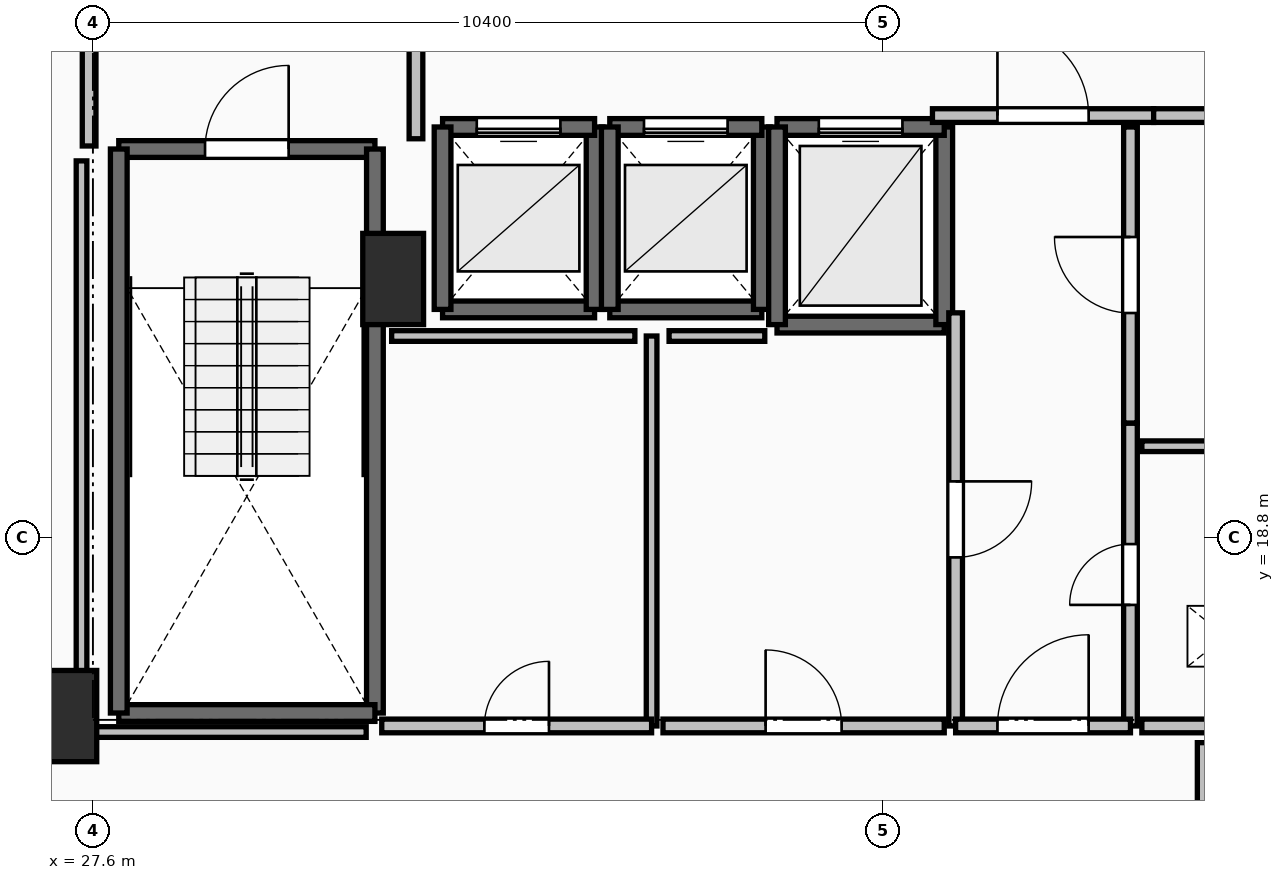
"""IFC4 building model, lengths in metres.
Left out: names, types, materials, properties, quantities, classifications, styles, units other than length and angle.
Written with IfcOpenShell. Run it as: python <this file> out.ifc"""

import sys

from ifc_helpers import new_model, si_unit, direction, frame, frame_2d, origin, origin_2d, place, context, subcontext, project, spatial, rectangle, extrude, element, fill, save


model = new_model("IFC4")
c1 = context("Model", 3, precision=1e-05, world=origin(), true_north=direction((0.0, 1.0)))
c2 = subcontext(c1, "Body", "Model", "MODEL_VIEW")
j1 = project(units=[si_unit("LENGTHUNIT", "METRE"), si_unit("PLANEANGLEUNIT", "RADIAN")], contexts=[c1])
p1 = place(None, origin())
s1 = spatial("IfcSite", under=j1, at=p1, CompositionType="ELEMENT")
p2 = place(p1, origin())
s2 = spatial("IfcBuilding", under=s1, at=p2, CompositionType="ELEMENT")
p3 = place(p2, frame((0.0, 0.0, 157.1)))
s3 = spatial("IfcBuildingStorey", under=s2, at=p3, CompositionType="ELEMENT", Elevation=157.1)
for number, where, z_axis, x_axis in (
    (1, (27.25, 16.45, 0.0), (0.0, 0.0, 1.0), (1.0, 0.0, 0.0)),
    (2, (31.55, 22.2, 0.0), (0.0, 0.0, 1.0), (1.0, 0.0, 0.0)),
):
    element("IfcColumn", number, at=place(p3, frame(where, z_axis=z_axis, x_axis=x_axis)), inside=s3, PredefinedType="PILASTER", context=c2, shape_type="SweptSolid", body=[
        extrude(rectangle(XDim=0.8, YDim=1.2, at=origin_2d()), origin(), (0.0, 0.0, 1.0), 3.5),
    ])
p4 = place(p3, frame((27.94, 23.91, 0.0), z_axis=(0.0, 0.0, 1.0), x_axis=(1.0, 0.0, 0.0)))
e3 = element("IfcWall", 3, at=p4, inside=s3, PredefinedType="SOLIDWALL", context=c2, shape_type="SweptSolid", body=[
    extrude(rectangle(XDim=3.37, YDim=0.22, at=frame_2d((1.685, 0.0))), origin(), (0.0, 0.0, 1.0), 3.24),
])
p5 = place(p4, frame((1.135, 0.0, 0.0)))
e4 = element("IfcOpeningElement", 4, at=p5, cuts=e3, PredefinedType="OPENING", context=c2, shape_type="SweptSolid", body=[
    extrude(rectangle(XDim=1.1, YDim=2.15, at=frame_2d((0.55, 1.075))), frame((0.0, 0.125, 0.0), z_axis=(0.0, -1.0, 0.0), x_axis=(1.0, 0.0, 0.0)), (0.0, 0.0, 1.0), 0.25),
])
p6 = place(p3, frame((31.31, 23.91, 0.0), z_axis=(0.0, 0.0, 1.0), x_axis=(0.0, -1.0, 0.0)))
e5 = element("IfcWall", 5, at=p6, inside=s3, PredefinedType="SOLIDWALL", context=c2, shape_type="SweptSolid", body=[
    extrude(rectangle(XDim=7.42, YDim=0.22, at=frame_2d((3.71, 0.0))), origin(), (0.0, 0.0, 1.0), 3.24),
])
p7 = place(p3, frame((31.31, 16.49, 0.0), z_axis=(0.0, 0.0, 1.0), x_axis=(-1.0, 0.0, 0.0)))
e6 = element("IfcWall", 6, at=p7, inside=s3, PredefinedType="SOLIDWALL", context=c2, shape_type="SweptSolid", body=[
    extrude(rectangle(XDim=3.37, YDim=0.22, at=frame_2d((1.685, 0.0))), origin(), (0.0, 0.0, 1.0), 3.24),
])
p8 = place(p3, frame((27.94, 16.49, 0.0), z_axis=(0.0, 0.0, 1.0), x_axis=(0.0, 1.0, 0.0)))
e7 = element("IfcWall", 7, at=p8, inside=s3, PredefinedType="SOLIDWALL", context=c2, shape_type="SweptSolid", body=[
    extrude(rectangle(XDim=7.42, YDim=0.22, at=frame_2d((3.71, 0.0))), origin(), (0.0, 0.0, 1.0), 3.24),
])
p9 = place(p3, frame((32.2, 21.8, 0.0), z_axis=(0.0, 0.0, 1.0), x_axis=(1.0, 0.0, 0.0)))
e8 = element("IfcWall", 8, at=p9, inside=s3, PredefinedType="SOLIDWALL", context=c2, shape_type="SweptSolid", body=[
    extrude(rectangle(XDim=2.0, YDim=0.22, at=frame_2d((1.0, 0.0))), origin(), (0.0, 0.0, 1.0), 3.24),
])
p10 = place(p3, frame((34.2, 21.8, 0.0), z_axis=(0.0, 0.0, 1.0), x_axis=(0.0, 1.0, 0.0)))
e9 = element("IfcWall", 9, at=p10, inside=s3, PredefinedType="SOLIDWALL", context=c2, shape_type="SweptSolid", body=[
    extrude(rectangle(XDim=2.4, YDim=0.22, at=frame_2d((1.2, 0.0))), origin(), (0.0, 0.0, 1.0), 3.24),
])
p11 = place(p3, frame((34.2, 24.2, 0.0), z_axis=(0.0, 0.0, 1.0), x_axis=(-1.0, 0.0, 0.0)))
e10 = element("IfcWall", 10, at=p11, inside=s3, PredefinedType="SOLIDWALL", context=c2, shape_type="SweptSolid", body=[
    extrude(rectangle(XDim=2.0, YDim=0.22, at=frame_2d((1.0, 0.0))), origin(), (0.0, 0.0, 1.0), 3.24),
])
p12 = place(p11, frame((0.45, 0.0, 0.0)))
e11 = element("IfcOpeningElement", 11, at=p12, cuts=e10, PredefinedType="OPENING", context=c2, shape_type="SweptSolid", body=[
    extrude(rectangle(XDim=1.1, YDim=2.2, at=frame_2d((0.55, 1.1))), frame((0.0, 0.125, 0.0), z_axis=(0.0, -1.0, 0.0), x_axis=(1.0, 0.0, 0.0)), (0.0, 0.0, 1.0), 0.25),
])
p13 = place(p3, frame((32.2, 24.2, 0.0), z_axis=(0.0, 0.0, 1.0), x_axis=(0.0, -1.0, 0.0)))
e12 = element("IfcWall", 12, at=p13, inside=s3, PredefinedType="SOLIDWALL", context=c2, shape_type="SweptSolid", body=[
    extrude(rectangle(XDim=2.4, YDim=0.22, at=frame_2d((1.2, 0.0))), origin(), (0.0, 0.0, 1.0), 3.24),
])
p14 = place(p3, frame((34.4, 21.8, 0.0), z_axis=(0.0, 0.0, 1.0), x_axis=(1.0, 0.0, 0.0)))
e13 = element("IfcWall", 13, at=p14, inside=s3, PredefinedType="SOLIDWALL", context=c2, shape_type="SweptSolid", body=[
    extrude(rectangle(XDim=2.0, YDim=0.22, at=frame_2d((1.0, 0.0))), origin(), (0.0, 0.0, 1.0), 3.24),
])
p15 = place(p3, frame((36.4, 21.8, 0.0), z_axis=(0.0, 0.0, 1.0), x_axis=(0.0, 1.0, 0.0)))
e14 = element("IfcWall", 14, at=p15, inside=s3, PredefinedType="SOLIDWALL", context=c2, shape_type="SweptSolid", body=[
    extrude(rectangle(XDim=2.4, YDim=0.22, at=frame_2d((1.2, 0.0))), origin(), (0.0, 0.0, 1.0), 3.24),
])
p16 = place(p3, frame((36.4, 24.2, 0.0), z_axis=(0.0, 0.0, 1.0), x_axis=(-1.0, 0.0, 0.0)))
e15 = element("IfcWall", 15, at=p16, inside=s3, PredefinedType="SOLIDWALL", context=c2, shape_type="SweptSolid", body=[
    extrude(rectangle(XDim=2.0, YDim=0.22, at=frame_2d((1.0, 0.0))), origin(), (0.0, 0.0, 1.0), 3.24),
])
p17 = place(p16, frame((0.45, 0.0, 0.0)))
e16 = element("IfcOpeningElement", 16, at=p17, cuts=e15, PredefinedType="OPENING", context=c2, shape_type="SweptSolid", body=[
    extrude(rectangle(XDim=1.1, YDim=2.2, at=frame_2d((0.55, 1.1))), frame((0.0, 0.125, 0.0), z_axis=(0.0, -1.0, 0.0), x_axis=(1.0, 0.0, 0.0)), (0.0, 0.0, 1.0), 0.25),
])
p18 = place(p3, frame((34.4, 24.2, 0.0), z_axis=(0.0, 0.0, 1.0), x_axis=(0.0, -1.0, 0.0)))
e17 = element("IfcWall", 17, at=p18, inside=s3, PredefinedType="SOLIDWALL", context=c2, shape_type="SweptSolid", body=[
    extrude(rectangle(XDim=2.4, YDim=0.22, at=frame_2d((1.2, 0.0))), origin(), (0.0, 0.0, 1.0), 3.24),
])
p19 = place(p3, frame((36.6, 21.6, 0.0), z_axis=(0.0, 0.0, 1.0), x_axis=(1.0, 0.0, 0.0)))
e18 = element("IfcWall", 18, at=p19, inside=s3, PredefinedType="SOLIDWALL", context=c2, shape_type="SweptSolid", body=[
    extrude(rectangle(XDim=2.2, YDim=0.22, at=frame_2d((1.1, 0.0))), origin(), (0.0, 0.0, 1.0), 3.24),
])
p20 = place(p3, frame((38.8, 21.6, 0.0), z_axis=(0.0, 0.0, 1.0), x_axis=(0.0, 1.0, 0.0)))
e19 = element("IfcWall", 19, at=p20, inside=s3, PredefinedType="SOLIDWALL", context=c2, shape_type="SweptSolid", body=[
    extrude(rectangle(XDim=2.6, YDim=0.22, at=frame_2d((1.3, 0.0))), origin(), (0.0, 0.0, 1.0), 3.24),
])
p21 = place(p3, frame((38.8, 24.2, 0.0), z_axis=(0.0, 0.0, 1.0), x_axis=(-1.0, 0.0, 0.0)))
e20 = element("IfcWall", 20, at=p21, inside=s3, PredefinedType="SOLIDWALL", context=c2, shape_type="SweptSolid", body=[
    extrude(rectangle(XDim=2.2, YDim=0.22, at=frame_2d((1.1, 0.0))), origin(), (0.0, 0.0, 1.0), 3.24),
])
p22 = place(p21, frame((0.55, 0.0, 0.0)))
e21 = element("IfcOpeningElement", 21, at=p22, cuts=e20, PredefinedType="OPENING", context=c2, shape_type="SweptSolid", body=[
    extrude(rectangle(XDim=1.1, YDim=2.2, at=frame_2d((0.55, 1.1))), frame((0.0, 0.125, 0.0), z_axis=(0.0, -1.0, 0.0), x_axis=(1.0, 0.0, 0.0)), (0.0, 0.0, 1.0), 0.25),
])
p23 = place(p3, frame((36.6, 24.2, 0.0), z_axis=(0.0, 0.0, 1.0), x_axis=(0.0, -1.0, 0.0)))
e22 = element("IfcWall", 22, at=p23, inside=s3, PredefinedType="SOLIDWALL", context=c2, shape_type="SweptSolid", body=[
    extrude(rectangle(XDim=2.6, YDim=0.22, at=frame_2d((1.3, 0.0))), origin(), (0.0, 0.0, 1.0), 3.24),
])
p24 = place(p3, frame((31.85, 24.045, 0.0), z_axis=(0.0, 0.0, 1.0), x_axis=(0.0, 1.0, 0.0)))
e23 = element("IfcWall", 23, at=p24, inside=s3, PredefinedType="PARTITIONING", context=c2, shape_type="SweptSolid", body=[
    extrude(rectangle(XDim=3.91, YDim=0.18, at=frame_2d((1.955, 0.0))), origin(), (0.0, 0.0, 1.0), 3.24),
])
p25 = place(p24, frame((1.355, 0.0, 0.0)))
e24 = element("IfcOpeningElement", 24, at=p25, cuts=e23, PredefinedType="OPENING", context=c2, shape_type="SweptSolid", body=[
    extrude(rectangle(XDim=1.2, YDim=2.15, at=frame_2d((0.6, 1.075))), frame((0.0, 0.105, 0.0), z_axis=(0.0, -1.0, 0.0), x_axis=(1.0, 0.0, 0.0)), (0.0, 0.0, 1.0), 0.21),
])
p26 = place(p3, frame((27.55, 28.0, 0.0), z_axis=(0.0, 0.0, 1.0), x_axis=(0.0, -1.0, 0.0)))
e25 = element("IfcWall", 25, at=p26, inside=s3, PredefinedType="PARTITIONING", context=c2, shape_type="SweptSolid", body=[
    extrude(rectangle(XDim=4.05, YDim=0.18, at=frame_2d((2.025, 0.0))), origin(), (0.0, 0.0, 1.0), 3.24),
])
p27 = place(p26, frame((1.425, 0.0, 0.0)))
e26 = element("IfcOpeningElement", 26, at=p27, cuts=e25, PredefinedType="OPENING", context=c2, shape_type="SweptSolid", body=[
    extrude(rectangle(XDim=1.2, YDim=2.15, at=frame_2d((0.6, 1.075))), frame((0.0, 0.105, 0.0), z_axis=(0.0, -1.0, 0.0), x_axis=(1.0, 0.0, 0.0)), (0.0, 0.0, 1.0), 0.21),
])
p28 = place(p3, frame((38.645, 24.35, 0.0), z_axis=(0.0, 0.0, 1.0), x_axis=(1.0, 0.0, 0.0)))
e27 = element("IfcWall", 27, at=p28, inside=s3, PredefinedType="PARTITIONING", context=c2, shape_type="SweptSolid", body=[
    extrude(rectangle(XDim=2.91, YDim=0.18, at=frame_2d((1.455, 0.0))), origin(), (0.0, 0.0, 1.0), 3.24),
])
p29 = place(p28, frame((0.855, 0.0, 0.0)))
e28 = element("IfcOpeningElement", 28, at=p29, cuts=e27, PredefinedType="OPENING", context=c2, shape_type="SweptSolid", body=[
    extrude(rectangle(XDim=1.2, YDim=2.15, at=frame_2d((0.6, 1.075))), frame((0.0, 0.105, 0.0), z_axis=(0.0, -1.0, 0.0), x_axis=(1.0, 0.0, 0.0)), (0.0, 0.0, 1.0), 0.21),
])
p30 = place(p3, frame((41.555, 24.35, 0.0), z_axis=(0.0, 0.0, 1.0), x_axis=(1.0, 0.0, 0.0)))
e29 = element("IfcWall", 29, at=p30, inside=s3, PredefinedType="PARTITIONING", context=c2, shape_type="SweptSolid", body=[
    extrude(rectangle(XDim=2.445, YDim=0.18, at=frame_2d((1.223, 0.0))), origin(), (0.0, 0.0, 1.0), 3.24),
])
p31 = place(p30, frame((0.722, 0.0, 0.0)))
e30 = element("IfcOpeningElement", 30, at=p31, cuts=e29, PredefinedType="OPENING", context=c2, shape_type="SweptSolid", body=[
    extrude(rectangle(XDim=1.0, YDim=2.15, at=frame_2d((0.5, 1.075))), frame((0.0, 0.105, 0.0), z_axis=(0.0, -1.0, 0.0), x_axis=(1.0, 0.0, 0.0)), (0.0, 0.0, 1.0), 0.21),
])
p32 = place(p3, frame((41.25, 16.32, 0.0), z_axis=(0.0, 0.0, 1.0), x_axis=(0.0, 1.0, 0.0)))
e31 = element("IfcWall", 31, at=p32, inside=s3, PredefinedType="PARTITIONING", context=c2, shape_type="SweptSolid", body=[
    extrude(rectangle(XDim=3.985, YDim=0.18, at=frame_2d((1.992, 0.0))), origin(), (0.0, 0.0, 1.0), 3.24),
])
p33 = place(p32, frame((1.593, 0.0, 0.0)))
e32 = element("IfcOpeningElement", 32, at=p33, cuts=e31, PredefinedType="OPENING", context=c2, shape_type="SweptSolid", body=[
    extrude(rectangle(XDim=0.8, YDim=2.05, at=frame_2d((0.4, 1.025))), frame((0.0, 0.105, 0.0), z_axis=(0.0, -1.0, 0.0), x_axis=(1.0, 0.0, 0.0)), (0.0, 0.0, 1.0), 0.21),
])
p34 = place(p3, frame((41.25, 20.305, 0.0), z_axis=(0.0, 0.0, 1.0), x_axis=(0.0, 1.0, 0.0)))
e33 = element("IfcWall", 33, at=p34, inside=s3, PredefinedType="PARTITIONING", context=c2, shape_type="SweptSolid", body=[
    extrude(rectangle(XDim=3.895, YDim=0.18, at=frame_2d((1.948, 0.0))), origin(), (0.0, 0.0, 1.0), 3.24),
])
p35 = place(p34, frame((1.448, 0.0, 0.0)))
e34 = element("IfcOpeningElement", 34, at=p35, cuts=e33, PredefinedType="OPENING", context=c2, shape_type="SweptSolid", body=[
    extrude(rectangle(XDim=1.0, YDim=2.15, at=frame_2d((0.5, 1.075))), frame((0.0, 0.105, 0.0), z_axis=(0.0, -1.0, 0.0), x_axis=(1.0, 0.0, 0.0)), (0.0, 0.0, 1.0), 0.21),
])
p36 = place(p3, frame((38.95, 21.755, 0.0), z_axis=(0.0, 0.0, 1.0), x_axis=(0.0, -1.0, 0.0)))
e35 = element("IfcWall", 35, at=p36, inside=s3, PredefinedType="PARTITIONING", context=c2, shape_type="SweptSolid", body=[
    extrude(rectangle(XDim=5.435, YDim=0.18, at=frame_2d((2.717, 0.0))), origin(), (0.0, 0.0, 1.0), 3.24),
])
p37 = place(p36, frame((2.218, 0.0, 0.0)))
e36 = element("IfcOpeningElement", 36, at=p37, cuts=e35, PredefinedType="OPENING", context=c2, shape_type="SweptSolid", body=[
    extrude(rectangle(XDim=1.0, YDim=2.15, at=frame_2d((0.5, 1.075))), frame((0.0, 0.105, 0.0), z_axis=(0.0, -1.0, 0.0), x_axis=(1.0, 0.0, 0.0)), (0.0, 0.0, 1.0), 0.21),
])
p38 = place(p3, frame((38.95, 16.32, 0.0), z_axis=(0.0, 0.0, 1.0), x_axis=(1.0, 0.0, 0.0)))
e37 = element("IfcWall", 37, at=p38, inside=s3, PredefinedType="PARTITIONING", context=c2, shape_type="SweptSolid", body=[
    extrude(rectangle(XDim=2.3, YDim=0.18, at=frame_2d((1.15, 0.0))), origin(), (0.0, 0.0, 1.0), 3.24),
])
p39 = place(p38, frame((0.55, 0.0, 0.0)))
e38 = element("IfcOpeningElement", 38, at=p39, cuts=e37, PredefinedType="OPENING", context=c2, shape_type="SweptSolid", body=[
    extrude(rectangle(XDim=1.2, YDim=2.15, at=frame_2d((0.6, 1.075))), frame((0.0, 0.105, 0.0), z_axis=(0.0, -1.0, 0.0), x_axis=(1.0, 0.0, 0.0)), (0.0, 0.0, 1.0), 0.21),
])
p40 = place(p3, frame((44.6, 20.0, 0.0), z_axis=(0.0, 0.0, 1.0), x_axis=(-1.0, 0.0, 0.0)))
e39 = element("IfcWall", 39, at=p40, inside=s3, PredefinedType="PARTITIONING", context=c2, shape_type="SweptSolid", body=[
    extrude(rectangle(XDim=3.2, YDim=0.14, at=frame_2d((1.6, 0.0))), origin(), (0.0, 0.0, 1.0), 3.24),
])
p41 = place(p3, frame((41.4, 16.32, 0.0), z_axis=(0.0, 0.0, 1.0), x_axis=(1.0, 0.0, 0.0)))
e40 = element("IfcWall", 40, at=p41, inside=s3, PredefinedType="PARTITIONING", context=c2, shape_type="SweptSolid", body=[
    extrude(rectangle(XDim=3.2, YDim=0.18, at=frame_2d((1.6, 0.0))), origin(), (0.0, 0.0, 1.0), 3.24),
])
p42 = place(p41, frame((1.2, 0.0, 0.0)))
e41 = element("IfcOpeningElement", 41, at=p42, cuts=e40, PredefinedType="OPENING", context=c2, shape_type="SweptSolid", body=[
    extrude(rectangle(XDim=0.8, YDim=2.05, at=frame_2d((0.4, 1.025))), frame((0.0, 0.105, 0.0), z_axis=(0.0, -1.0, 0.0), x_axis=(1.0, 0.0, 0.0)), (0.0, 0.0, 1.0), 0.21),
])
p43 = place(p3, frame((34.95, 16.32, 0.0), z_axis=(0.0, 0.0, 1.0), x_axis=(0.0, 1.0, 0.0)))
e42 = element("IfcWall", 42, at=p43, inside=s3, PredefinedType="PARTITIONING", context=c2, shape_type="SweptSolid", body=[
    extrude(rectangle(XDim=5.13, YDim=0.14, at=frame_2d((2.565, 0.0))), origin(), (0.0, 0.0, 1.0), 3.24),
])
p44 = place(p3, frame((31.4, 16.32, 0.0), z_axis=(0.0, 0.0, 1.0), x_axis=(1.0, 0.0, 0.0)))
e43 = element("IfcWall", 43, at=p44, inside=s3, PredefinedType="PARTITIONING", context=c2, shape_type="SweptSolid", body=[
    extrude(rectangle(XDim=3.55, YDim=0.18, at=frame_2d((1.775, 0.0))), origin(), (0.0, 0.0, 1.0), 3.24),
])
p45 = place(p44, frame((1.35, 0.0, 0.0)))
e44 = element("IfcOpeningElement", 44, at=p45, cuts=e43, PredefinedType="OPENING", context=c2, shape_type="SweptSolid", body=[
    extrude(rectangle(XDim=0.85, YDim=2.1, at=frame_2d((0.425, 1.05))), frame((0.0, 0.105, 0.0), z_axis=(0.0, -1.0, 0.0), x_axis=(1.0, 0.0, 0.0)), (0.0, 0.0, 1.0), 0.21),
])
p46 = place(p3, frame((35.1, 16.32, 0.0), z_axis=(0.0, 0.0, 1.0), x_axis=(1.0, 0.0, 0.0)))
e45 = element("IfcWall", 45, at=p46, inside=s3, PredefinedType="PARTITIONING", context=c2, shape_type="SweptSolid", body=[
    extrude(rectangle(XDim=3.7, YDim=0.18, at=frame_2d((1.85, 0.0))), origin(), (0.0, 0.0, 1.0), 3.24),
])
p47 = place(p46, frame((1.35, 0.0, 0.0)))
e46 = element("IfcOpeningElement", 46, at=p47, cuts=e45, PredefinedType="OPENING", context=c2, shape_type="SweptSolid", body=[
    extrude(rectangle(XDim=1.0, YDim=2.15, at=frame_2d((0.5, 1.075))), frame((0.0, 0.105, 0.0), z_axis=(0.0, -1.0, 0.0), x_axis=(1.0, 0.0, 0.0)), (0.0, 0.0, 1.0), 0.21),
])
p48 = place(p3, frame((34.73, 21.45, 0.0), z_axis=(0.0, 0.0, 1.0), x_axis=(-1.0, 0.0, 0.0)))
e47 = element("IfcWall", 47, at=p48, inside=s3, PredefinedType="PARTITIONING", context=c2, shape_type="SweptSolid", body=[
    extrude(rectangle(XDim=3.2, YDim=0.14, at=frame_2d((1.6, 0.0))), origin(), (0.0, 0.0, 1.0), 3.24),
])
p49 = place(p3, frame((36.439, 21.45, 0.0), z_axis=(0.0, 0.0, 1.0), x_axis=(-1.0, 0.0, 0.0)))
e48 = element("IfcWall", 48, at=p49, inside=s3, PredefinedType="PARTITIONING", context=c2, shape_type="SweptSolid", body=[
    extrude(rectangle(XDim=1.259, YDim=0.14, at=frame_2d((0.629, 0.0))), origin(), (0.0, 0.0, 1.0), 3.24),
])
p50 = place(p3, frame((27.45, 23.754, 0.0), z_axis=(0.0, 0.0, 1.0), x_axis=(0.0, -1.0, 0.0)))
e49 = element("IfcWall", 49, at=p50, inside=s3, PredefinedType="PARTITIONING", context=c2, shape_type="SweptSolid", body=[
    extrude(rectangle(XDim=7.514, YDim=0.14, at=frame_2d((3.757, 0.0))), origin(), (0.0, 0.0, 1.0), 2.432),
])
p51 = place(p3, frame((27.45, 16.24, 0.0), z_axis=(0.0, 0.0, 1.0), x_axis=(1.0, 0.0, 0.0)))
e50 = element("IfcWall", 50, at=p51, inside=s3, PredefinedType="PARTITIONING", context=c2, shape_type="SweptSolid", body=[
    extrude(rectangle(XDim=3.745, YDim=0.14, at=frame_2d((1.873, 0.0))), origin(), (0.0, 0.0, 1.0), 2.432),
])
p52 = place(p3, frame((42.2, 16.1, 0.0), z_axis=(0.0, 0.0, 1.0), x_axis=(0.0, -1.0, 0.0)))
e51 = element("IfcWall", 51, at=p52, inside=s3, PredefinedType="PARTITIONING", context=c2, shape_type="SweptSolid", body=[
    extrude(rectangle(XDim=1.83, YDim=0.14, at=frame_2d((0.915, 0.0))), origin(), (0.0, 0.0, 1.0), 2.886),
])
p53 = place(p5, origin())
e52 = element("IfcDoor", 52, at=p53, inside=s3, OperationType="SINGLE_SWING_RIGHT", PredefinedType="DOOR", context=c2, shape_type="SweptSolid", body=[
    extrude(rectangle(XDim=1.1, YDim=2.15, at=frame_2d((0.55, 1.075))), frame((0.0, 0.025, 0.0), z_axis=(0.0, -1.0, 0.0), x_axis=(1.0, 0.0, 0.0)), (0.0, 0.0, 1.0), 0.05),
])
fill(e4, e52)
p54 = place(p12, origin())
e53 = element("IfcDoor", 53, at=p54, inside=s3, OperationType="SLIDING_TO_LEFT", PredefinedType="DOOR", context=c2, shape_type="SweptSolid", body=[
    extrude(rectangle(XDim=1.1, YDim=2.2, at=frame_2d((0.55, 1.1))), frame((0.0, 0.025, 0.0), z_axis=(0.0, -1.0, 0.0), x_axis=(1.0, 0.0, 0.0)), (0.0, 0.0, 1.0), 0.05),
])
fill(e11, e53)
p55 = place(p17, origin())
e54 = element("IfcDoor", 54, at=p55, inside=s3, OperationType="SLIDING_TO_LEFT", PredefinedType="DOOR", context=c2, shape_type="SweptSolid", body=[
    extrude(rectangle(XDim=1.1, YDim=2.2, at=frame_2d((0.55, 1.1))), frame((0.0, 0.025, 0.0), z_axis=(0.0, -1.0, 0.0), x_axis=(1.0, 0.0, 0.0)), (0.0, 0.0, 1.0), 0.05),
])
fill(e16, e54)
p56 = place(p22, origin())
e55 = element("IfcDoor", 55, at=p56, inside=s3, OperationType="SLIDING_TO_LEFT", PredefinedType="DOOR", context=c2, shape_type="SweptSolid", body=[
    extrude(rectangle(XDim=1.1, YDim=2.2, at=frame_2d((0.55, 1.1))), frame((0.0, 0.025, 0.0), z_axis=(0.0, -1.0, 0.0), x_axis=(1.0, 0.0, 0.0)), (0.0, 0.0, 1.0), 0.05),
])
fill(e21, e55)
p57 = place(p29, origin())
e56 = element("IfcDoor", 56, at=p57, inside=s3, OperationType="SINGLE_SWING_LEFT", PredefinedType="DOOR", context=c2, shape_type="SweptSolid", body=[
    extrude(rectangle(XDim=1.2, YDim=2.15, at=frame_2d((0.6, 1.075))), frame((0.0, 0.025, 0.0), z_axis=(0.0, -1.0, 0.0), x_axis=(1.0, 0.0, 0.0)), (0.0, 0.0, 1.0), 0.05),
])
fill(e28, e56)
p58 = place(p33, origin())
e57 = element("IfcDoor", 57, at=p58, inside=s3, OperationType="SINGLE_SWING_LEFT", PredefinedType="DOOR", context=c2, shape_type="SweptSolid", body=[
    extrude(rectangle(XDim=0.8, YDim=2.05, at=frame_2d((0.4, 1.025))), frame((0.0, 0.025, 0.0), z_axis=(0.0, -1.0, 0.0), x_axis=(1.0, 0.0, 0.0)), (0.0, 0.0, 1.0), 0.05),
])
fill(e32, e57)
p59 = place(p35, origin())
e58 = element("IfcDoor", 58, at=p59, inside=s3, OperationType="SINGLE_SWING_RIGHT", PredefinedType="DOOR", context=c2, shape_type="SweptSolid", body=[
    extrude(rectangle(XDim=1.0, YDim=2.15, at=frame_2d((0.5, 1.075))), frame((0.0, 0.025, 0.0), z_axis=(0.0, -1.0, 0.0), x_axis=(1.0, 0.0, 0.0)), (0.0, 0.0, 1.0), 0.05),
])
fill(e34, e58)
p60 = place(p37, origin())
e59 = element("IfcDoor", 59, at=p60, inside=s3, OperationType="SINGLE_SWING_LEFT", PredefinedType="DOOR", context=c2, shape_type="SweptSolid", body=[
    extrude(rectangle(XDim=1.0, YDim=2.15, at=frame_2d((0.5, 1.075))), frame((0.0, 0.025, 0.0), z_axis=(0.0, -1.0, 0.0), x_axis=(1.0, 0.0, 0.0)), (0.0, 0.0, 1.0), 0.05),
])
fill(e36, e59)
p61 = place(p39, origin())
e60 = element("IfcDoor", 60, at=p61, inside=s3, OperationType="SINGLE_SWING_RIGHT", PredefinedType="DOOR", context=c2, shape_type="SweptSolid", body=[
    extrude(rectangle(XDim=1.2, YDim=2.15, at=frame_2d((0.6, 1.075))), frame((0.0, 0.025, 0.0), z_axis=(0.0, -1.0, 0.0), x_axis=(1.0, 0.0, 0.0)), (0.0, 0.0, 1.0), 0.05),
])
fill(e38, e60)
p62 = place(p45, origin())
e61 = element("IfcDoor", 61, at=p62, inside=s3, OperationType="SINGLE_SWING_RIGHT", PredefinedType="DOOR", context=c2, shape_type="SweptSolid", body=[
    extrude(rectangle(XDim=0.85, YDim=2.1, at=frame_2d((0.425, 1.05))), frame((0.0, 0.025, 0.0), z_axis=(0.0, -1.0, 0.0), x_axis=(1.0, 0.0, 0.0)), (0.0, 0.0, 1.0), 0.05),
])
fill(e44, e61)
p63 = place(p47, origin())
e62 = element("IfcDoor", 62, at=p63, inside=s3, OperationType="SINGLE_SWING_LEFT", PredefinedType="DOOR", context=c2, shape_type="SweptSolid", body=[
    extrude(rectangle(XDim=1.0, YDim=2.15, at=frame_2d((0.5, 1.075))), frame((0.0, 0.025, 0.0), z_axis=(0.0, -1.0, 0.0), x_axis=(1.0, 0.0, 0.0)), (0.0, 0.0, 1.0), 0.05),
])
fill(e46, e62)
save(model, sys.argv[1])
